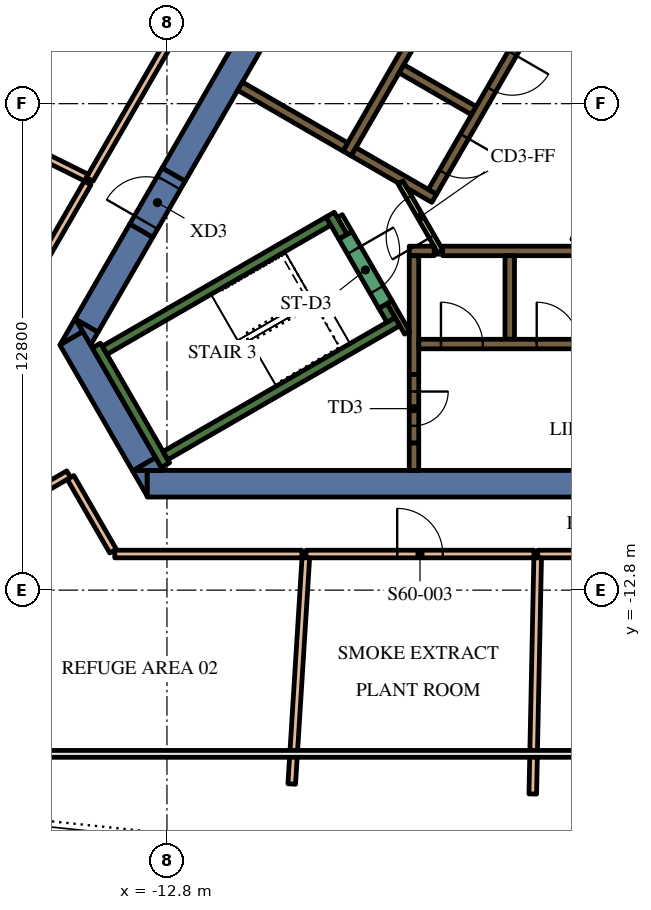
"""IFC4 building model, lengths in metres.
Left out: names, types, materials, properties, quantities, classifications, styles, units other than length and angle.
Written with IfcOpenShell. Run it as: python <this file> out.ifc"""

import sys

from ifc_helpers import new_model, si_unit, direction, frame, frame_2d, origin, place, context, subcontext, project, spatial, polyline, rectangle, outline, extrude, element, fill, save


model = new_model("IFC4")
c1 = context("Model", 3, precision=1e-05, world=origin(), true_north=direction((0.0, 1.0)))
c2 = subcontext(c1, "Body", "Model", "MODEL_VIEW")
j1 = project(units=[si_unit("LENGTHUNIT", "METRE"), si_unit("PLANEANGLEUNIT", "RADIAN")], contexts=[c1])
p1 = place(None, origin())
s1 = spatial("IfcSite", under=j1, at=p1, CompositionType="ELEMENT")
p2 = place(p1, origin())
s2 = spatial("IfcBuilding", under=s1, at=p2, CompositionType="ELEMENT")
p3 = place(p2, frame((0.0, 0.0, 256.2)))
s3 = spatial("IfcBuildingStorey", under=s2, at=p3, CompositionType="ELEMENT", Elevation=256.2)
p4 = place(p3, frame((8.904, -10.0, 0.0), z_axis=(0.0, 0.0, 1.0), x_axis=(-1.0, 0.0, 0.0)))
e1 = element("IfcWall", 1, at=p4, inside=s3, PredefinedType="SOLIDWALL", context=c2, shape_type="SweptSolid", body=[
    extrude(rectangle(XDim=22.226, YDim=0.7, at=frame_2d((11.113, 0.0))), origin(), (0.0, 0.0, 1.0), 5.4),
])
p5 = place(p3, origin())
e2 = element("IfcWall", 2, at=p5, inside=s3, PredefinedType="SOLIDWALL", context=c2, shape_type="SweptSolid", body=[
    extrude(outline(polyline([(-13.712, -9.65), (-13.324, -9.65), (-13.324, -10.322), (-13.712, -9.65)])), origin(), (0.0, 0.0, 1.0), 5.4),
])
p6 = place(p3, frame((-13.402, -9.487, 0.0), z_axis=(0.0, 0.0, 1.0), x_axis=(-0.500020498207, 0.866013568815, 0.0)))
e3 = element("IfcWall", 3, at=p6, inside=s3, PredefinedType="SOLIDWALL", context=c2, shape_type="SweptSolid", body=[
    extrude(rectangle(XDim=3.829, YDim=0.7, at=frame_2d((1.915, 0.0))), origin(), (0.0, 0.0, 1.0), 5.4),
])
e4 = element("IfcWall", 4, at=p5, inside=s3, PredefinedType="SOLIDWALL", context=c2, shape_type="SweptSolid", body=[
    extrude(outline(polyline([(-15.014, -5.995), (-15.611, -6.339), (-15.213, -5.65), (-15.014, -5.995)])), origin(), (0.0, 0.0, 1.0), 5.4),
])
e5 = element("IfcWall", 5, at=p5, inside=s3, PredefinedType="SOLIDWALL", context=c2, shape_type="SweptSolid", body=[
    extrude(outline(polyline([(-12.904, -9.65), (-13.68, -9.65), (-13.098, -9.314), (-12.904, -9.65)])), origin(), (0.0, 0.0, 1.0), 5.4),
])
p7 = place(p3, frame((-13.475, -3.339, 0.0), z_axis=(0.0, 0.0, 1.0), x_axis=(-0.500008214683, -0.866020660983, 0.0)))
e6 = element("IfcWall", 6, at=p7, inside=s3, PredefinedType="SOLIDWALL", context=c2, shape_type="SweptSolid", body=[
    extrude(rectangle(XDim=2.884, YDim=0.7, at=frame_2d((1.442, 0.0))), origin(), (0.0, 0.0, 1.0), 5.4),
])
e7 = element("IfcWall", 7, at=p5, inside=s3, PredefinedType="SOLIDWALL", context=c2, shape_type="SweptSolid", body=[
    extrude(outline(polyline([(-14.809, -6.35), (-15.197, -5.678), (-14.615, -6.014), (-14.809, -6.35)])), origin(), (0.0, 0.0, 1.0), 5.4),
])
p8 = place(p3, frame((-12.625, -1.867, 0.0), z_axis=(0.0, 0.0, 1.0), x_axis=(0.499996974394, 0.866027150612, 0.0)))
e8 = element("IfcWall", 8, at=p8, inside=s3, PredefinedType="SOLIDWALL", context=c2, shape_type="SweptSolid", body=[
    extrude(rectangle(XDim=15.858, YDim=0.7, at=frame_2d((7.929, 0.0))), origin(), (0.0, 0.0, 1.0), 5.4),
])
p9 = place(p3, frame((-12.84, -9.511, 0.0), z_axis=(0.0, 0.0, 1.0), x_axis=(-0.499997733992, 0.866026712061, 0.0)))
e9 = element("IfcWall", 9, at=p9, inside=s3, PredefinedType="SOLIDWALL", context=c2, shape_type="SweptSolid", body=[
    extrude(rectangle(XDim=3.634, YDim=0.25, at=frame_2d((1.817, 0.0))), origin(), (0.0, 0.0, 1.0), 5.4),
])
p10 = place(p3, frame((-14.44, -6.49, 0.0), z_axis=(0.0, 0.0, 1.0), x_axis=(0.866022966069, 0.500004222222, 0.0)))
e10 = element("IfcWall", 10, at=p10, inside=s3, PredefinedType="SOLIDWALL", context=c2, shape_type="SweptSolid", body=[
    extrude(rectangle(XDim=6.8, YDim=0.25, at=frame_2d((3.4, 0.0))), origin(), (0.0, 0.0, 1.0), 5.4),
])
p11 = place(p3, frame((-8.168, -3.503, 0.0), z_axis=(0.0, 0.0, 1.0), x_axis=(-0.499952099219, 0.866053057547, 0.0)))
e11 = element("IfcWall", 11, at=p11, inside=s3, PredefinedType="SOLIDWALL", context=c2, shape_type="SweptSolid", body=[
    extrude(rectangle(XDim=0.675, YDim=0.25, at=frame_2d((0.337, 0.0))), origin(), (0.0, 0.0, 1.0), 5.4),
])
p12 = place(p3, frame((-12.84, -9.261, 0.0), z_axis=(0.0, 0.0, 1.0), x_axis=(0.866016039709, 0.500016218704, 0.0)))
e12 = element("IfcWall", 12, at=p12, inside=s3, PredefinedType="SOLIDWALL", context=c2, shape_type="SweptSolid", body=[
    extrude(rectangle(XDim=7.05, YDim=0.25, at=frame_2d((3.525, 0.0))), origin(), (0.0, 0.0, 1.0), 5.4),
])
p13 = place(p3, frame((-6.905, -5.69, 0.0), z_axis=(0.0, 0.0, 1.0), x_axis=(-0.500402024738, 0.865793170242, 0.0)))
e13 = element("IfcWall", 13, at=p13, inside=s3, PredefinedType="SOLIDWALL", context=c2, shape_type="SweptSolid", body=[
    extrude(rectangle(XDim=0.425, YDim=0.25, at=frame_2d((0.212, 0.0))), origin(), (0.0, 0.0, 1.0), 5.4),
])
p14 = place(p3, frame((-6.3, -8.925, 0.0), z_axis=(0.0, 0.0, 1.0), x_axis=(0.0, -1.0, 0.0)))
e14 = element("IfcWall", 14, at=p14, inside=s3, PredefinedType="SOLIDWALL", context=c2, shape_type="SweptSolid", body=[
    extrude(rectangle(XDim=0.725, YDim=0.25, at=frame_2d((0.363, 0.0))), origin(), (0.0, 0.0, 1.0), 5.4),
])
p15 = place(p3, frame((-5.545, -3.875, 0.0), z_axis=(0.0, 0.0, 1.0), x_axis=(1.0, 0.0, 0.0)))
e15 = element("IfcWall", 15, at=p15, inside=s3, PredefinedType="SOLIDWALL", context=c2, shape_type="SweptSolid", body=[
    extrude(rectangle(XDim=11.97, YDim=0.25, at=frame_2d((5.985, 0.0))), origin(), (0.0, 0.0, 1.0), 5.4),
])
p16 = place(p3, frame((-6.425, -3.875, 0.0), z_axis=(0.0, 0.0, 1.0), x_axis=(1.0, 0.0, 0.0)))
e16 = element("IfcWall", 16, at=p16, inside=s3, PredefinedType="SOLIDWALL", context=c2, shape_type="SweptSolid", body=[
    extrude(rectangle(XDim=0.658, YDim=0.25, at=frame_2d((0.329, 0.0))), origin(), (0.0, 0.0, 1.0), 5.4),
])
p17 = place(p3, frame((-3.78, -4.0, 0.0), z_axis=(0.0, 0.0, 1.0), x_axis=(0.0, -1.0, 0.0)))
e17 = element("IfcWall", 17, at=p17, inside=s3, PredefinedType="SOLIDWALL", context=c2, shape_type="SweptSolid", body=[
    extrude(rectangle(XDim=2.2, YDim=0.25, at=frame_2d((1.1, 0.0))), origin(), (0.0, 0.0, 1.0), 5.4),
])
p18 = place(p3, frame((-6.3, -7.125, 0.0), z_axis=(0.0, 0.0, 1.0), x_axis=(0.0, 1.0, 0.0)))
e18 = element("IfcWall", 18, at=p18, inside=s3, PredefinedType="SOLIDWALL", context=c2, shape_type="SweptSolid", body=[
    extrude(rectangle(XDim=3.125, YDim=0.25, at=frame_2d((1.562, 0.0))), origin(), (0.0, 0.0, 1.0), 5.4),
])
p19 = place(p3, frame((-8.06, -1.311, 0.0), z_axis=(0.0, 0.0, 1.0), x_axis=(0.50000273126, 0.866023826885, 0.0)))
e19 = element("IfcWall", 19, at=p19, inside=s3, PredefinedType="SOLIDWALL", context=c2, shape_type="SweptSolid", body=[
    extrude(rectangle(XDim=10.33, YDim=0.25, at=frame_2d((5.165, 0.0))), origin(), (0.0, 0.0, 1.0), 5.4),
])
p20 = place(p3, frame((-4.724, -0.182, 0.0), z_axis=(0.0, 0.0, 1.0), x_axis=(-0.866008176907, 0.50002983664, 0.0)))
e20 = element("IfcWall", 20, at=p20, inside=s3, PredefinedType="SOLIDWALL", context=c2, shape_type="SweptSolid", body=[
    extrude(rectangle(XDim=2.2, YDim=0.25, at=frame_2d((1.1, 0.0))), origin(), (0.0, 0.0, 1.0), 5.4),
])
e21 = element("IfcWall", 21, at=p5, inside=s3, PredefinedType="SOLIDWALL", context=c2, shape_type="SweptSolid", body=[
    extrude(outline(polyline([(-5.922, -2.257), (-5.922, -2.257), (-5.705, -2.382), (-5.83, -2.598), (-6.483, -2.221), (-6.591, -2.033), (-6.591, -2.033), (-6.7, -2.096), (-7.952, -1.373), (-7.827, -1.156), (-5.922, -2.257)])), origin(), (0.0, 0.0, 1.0), 5.4),
])
p21 = place(p3, frame((-8.106, -1.14, 0.0), z_axis=(0.0, 0.0, 1.0), x_axis=(-0.866008981251, 0.500028443584, 0.0)))
e22 = element("IfcWall", 22, at=p21, inside=s3, PredefinedType="SOLIDWALL", context=c2, shape_type="SweptSolid", body=[
    extrude(rectangle(XDim=3.2, YDim=0.25, at=frame_2d((1.6, 0.0))), origin(), (0.0, 0.0, 1.0), 5.4),
])
p22 = place(p3, frame((-8.252, -2.958, 0.0), z_axis=(0.0, 0.0, 1.0), x_axis=(0.500174715838, -0.865924508047, 0.0)))
e23 = element("IfcWall", 23, at=p22, inside=s3, PredefinedType="PARTITIONING", context=c2, shape_type="SweptSolid", body=[
    extrude(rectangle(XDim=0.514, YDim=0.15, at=frame_2d((0.257, 0.0))), origin(), (0.0, 0.0, 1.0), 4.3),
])
p23 = place(p3, frame((-6.48, -6.027, 0.0), z_axis=(0.0, 0.0, 1.0), x_axis=(-0.499927229454, 0.866067413802, 0.0)))
e24 = element("IfcWall", 24, at=p23, inside=s3, PredefinedType="PARTITIONING", context=c2, shape_type="SweptSolid", body=[
    extrude(rectangle(XDim=0.929, YDim=0.15, at=frame_2d((0.464, 0.0))), origin(), (0.0, 0.0, 1.0), 5.4),
])
e25 = element("IfcWall", 25, at=p5, inside=s3, PredefinedType="PARTITIONING", context=c2, shape_type="SweptSolid", body=[
    extrude(outline(polyline([(-0.59, -0.872), (-0.265, -1.059), (-1.822, -3.756), (-2.147, -3.568), (-0.59, -0.872)])), origin(), (0.0, 0.0, 1.0), 4.3),
])
p24 = place(p3, frame((-6.175, -6.325, 0.0), z_axis=(0.0, 0.0, 1.0), x_axis=(1.0, 0.0, 0.0)))
e26 = element("IfcWall", 26, at=p24, inside=s3, PredefinedType="SOLIDWALL", context=c2, shape_type="SweptSolid", body=[
    extrude(rectangle(XDim=12.35, YDim=0.25, at=frame_2d((6.175, 0.0))), origin(), (0.0, 0.0, 1.0), 5.4),
])
p25 = place(p24, frame((0.585, 0.0, 0.0)))
e27 = element("IfcOpeningElement", 27, at=p25, cuts=e26, PredefinedType="OPENING", context=c2, shape_type="SweptSolid", body=[
    extrude(rectangle(XDim=1.1, YDim=2.1, at=frame_2d((0.55, 1.05))), frame((0.0, 0.135, 0.0), z_axis=(0.0, -1.0, 0.0), x_axis=(1.0, 0.0, 0.0)), (0.0, 0.0, 1.0), 0.27),
])
p26 = place(p24, frame((3.105, 0.0, 0.0)))
e28 = element("IfcOpeningElement", 28, at=p26, cuts=e26, PredefinedType="OPENING", context=c2, shape_type="SweptSolid", body=[
    extrude(rectangle(XDim=1.1, YDim=2.1, at=frame_2d((0.55, 1.05))), frame((0.0, 0.135, 0.0), z_axis=(0.0, -1.0, 0.0), x_axis=(1.0, 0.0, 0.0)), (0.0, 0.0, 1.0), 0.27),
])
p27 = place(p24, frame((5.625, 0.0, 0.0)))
e29 = element("IfcOpeningElement", 29, at=p27, cuts=e26, PredefinedType="OPENING", context=c2, shape_type="SweptSolid", body=[
    extrude(rectangle(XDim=1.1, YDim=2.1, at=frame_2d((0.55, 1.05))), frame((0.0, 0.135, 0.0), z_axis=(0.0, -1.0, 0.0), x_axis=(1.0, 0.0, 0.0)), (0.0, 0.0, 1.0), 0.27),
])
p28 = place(p24, frame((8.145, 0.0, 0.0)))
e30 = element("IfcOpeningElement", 30, at=p28, cuts=e26, PredefinedType="OPENING", context=c2, shape_type="SweptSolid", body=[
    extrude(rectangle(XDim=1.1, YDim=2.1, at=frame_2d((0.55, 1.05))), frame((0.0, 0.135, 0.0), z_axis=(0.0, -1.0, 0.0), x_axis=(1.0, 0.0, 0.0)), (0.0, 0.0, 1.0), 0.27),
])
p29 = place(p24, frame((10.665, 0.0, 0.0)))
e31 = element("IfcOpeningElement", 31, at=p29, cuts=e26, PredefinedType="OPENING", context=c2, shape_type="SweptSolid", body=[
    extrude(rectangle(XDim=1.1, YDim=2.1, at=frame_2d((0.55, 1.05))), frame((0.0, 0.135, 0.0), z_axis=(0.0, -1.0, 0.0), x_axis=(1.0, 0.0, 0.0)), (0.0, 0.0, 1.0), 0.27),
])
p30 = place(p3, frame((-0.898, 6.194, 0.0), z_axis=(0.0, 0.0, 1.0), x_axis=(-0.499996202215, -0.866027596426, 0.0)))
e32 = element("IfcWall", 32, at=p30, inside=s3, PredefinedType="SOLIDWALL", context=c2, shape_type="SweptSolid", body=[
    extrude(rectangle(XDim=9.83, YDim=0.25, at=frame_2d((4.915, 0.0))), origin(), (0.0, 0.0, 1.0), 5.4),
])
p31 = place(p30, frame((0.585, 0.0, 0.0)))
e33 = element("IfcOpeningElement", 33, at=p31, cuts=e32, PredefinedType="OPENING", context=c2, shape_type="SweptSolid", body=[
    extrude(rectangle(XDim=1.1, YDim=2.1, at=frame_2d((0.55, 1.05))), frame((0.0, 0.135, 0.0), z_axis=(0.0, -1.0, 0.0), x_axis=(1.0, 0.0, 0.0)), (0.0, 0.0, 1.0), 0.27),
])
p32 = place(p30, frame((3.105, 0.0, 0.0)))
e34 = element("IfcOpeningElement", 34, at=p32, cuts=e32, PredefinedType="OPENING", context=c2, shape_type="SweptSolid", body=[
    extrude(rectangle(XDim=1.1, YDim=2.1, at=frame_2d((0.55, 1.05))), frame((0.0, 0.135, 0.0), z_axis=(0.0, -1.0, 0.0), x_axis=(1.0, 0.0, 0.0)), (0.0, 0.0, 1.0), 0.27),
])
p33 = place(p30, frame((5.625, 0.0, 0.0)))
e35 = element("IfcOpeningElement", 35, at=p33, cuts=e32, PredefinedType="OPENING", context=c2, shape_type="SweptSolid", body=[
    extrude(rectangle(XDim=1.1, YDim=2.1, at=frame_2d((0.55, 1.05))), frame((0.0, 0.135, 0.0), z_axis=(0.0, -1.0, 0.0), x_axis=(1.0, 0.0, 0.0)), (0.0, 0.0, 1.0), 0.27),
])
p34 = place(p30, frame((8.145, 0.0, 0.0)))
e36 = element("IfcOpeningElement", 36, at=p34, cuts=e32, PredefinedType="OPENING", context=c2, shape_type="SweptSolid", body=[
    extrude(rectangle(XDim=1.1, YDim=2.1, at=frame_2d((0.55, 1.05))), frame((0.0, 0.135, 0.0), z_axis=(0.0, -1.0, 0.0), x_axis=(1.0, 0.0, 0.0)), (0.0, 0.0, 1.0), 0.27),
])
p35 = place(p3, frame((-8.103, -3.466, 0.0), z_axis=(0.0, 0.0, 1.0), x_axis=(0.500078061341, -0.865980330357, 0.0)))
e37 = element("IfcWall", 37, at=p35, inside=s3, PredefinedType="SOLIDWALL", context=c2, shape_type="SweptSolid", body=[
    extrude(rectangle(XDim=2.1, YDim=0.4, at=frame_2d((1.05, 0.0))), origin(), (0.0, 0.0, 1.0), 5.4),
])
p36 = place(p35, frame((0.45, 0.0, 0.0)))
e38 = element("IfcOpeningElement", 38, at=p36, cuts=e37, PredefinedType="OPENING", context=c2, shape_type="SweptSolid", body=[
    extrude(rectangle(XDim=1.2, YDim=2.1, at=frame_2d((0.6, 1.05))), frame((0.0, 0.21, 0.0), z_axis=(0.0, -1.0, 0.0), x_axis=(1.0, 0.0, 0.0)), (0.0, 0.0, 1.0), 0.42),
])
p37 = place(p3, frame((-6.3, -7.125, 0.0), z_axis=(0.0, 0.0, 1.0), x_axis=(0.0, -1.0, 0.0)))
e39 = element("IfcWall", 39, at=p37, inside=s3, PredefinedType="SOLIDWALL", context=c2, shape_type="SweptSolid", body=[
    extrude(rectangle(XDim=1.8, YDim=0.25, at=frame_2d((0.9, 0.0))), origin(), (0.0, 0.0, 1.0), 5.4),
])
p38 = place(p37, frame((0.45, 0.0, 0.0)))
e40 = element("IfcOpeningElement", 40, at=p38, cuts=e39, PredefinedType="OPENING", context=c2, shape_type="SweptSolid", body=[
    extrude(rectangle(XDim=0.9, YDim=2.1, at=frame_2d((0.45, 1.05))), frame((0.0, 0.135, 0.0), z_axis=(0.0, -1.0, 0.0), x_axis=(1.0, 0.0, 0.0)), (0.0, 0.0, 1.0), 0.27),
])
p39 = place(p3, frame((-5.606, -3.89, 0.0), z_axis=(0.0, 0.0, 1.0), x_axis=(-0.500027713859, 0.866009402589, 0.0)))
e41 = element("IfcWall", 41, at=p39, inside=s3, PredefinedType="PARTITIONING", context=c2, shape_type="SweptSolid", body=[
    extrude(rectangle(XDim=2.1, YDim=0.15, at=frame_2d((1.05, 0.0))), origin(), (0.0, 0.0, 1.0), 4.3),
])
p40 = place(p39, frame((0.45, 0.0, 0.0)))
e42 = element("IfcOpeningElement", 42, at=p40, cuts=e41, PredefinedType="OPENING", context=c2, shape_type="SweptSolid", body=[
    extrude(rectangle(XDim=1.2, YDim=2.1, at=frame_2d((0.6, 1.05))), frame((0.0, 0.085, 0.0), z_axis=(0.0, -1.0, 0.0), x_axis=(1.0, 0.0, 0.0)), (0.0, 0.0, 1.0), 0.17),
])
p41 = place(p3, frame((-13.475, -3.339, 0.0), z_axis=(0.0, 0.0, 1.0), x_axis=(0.499954529098, 0.86605165483, 0.0)))
e43 = element("IfcWall", 43, at=p41, inside=s3, PredefinedType="SOLIDWALL", context=c2, shape_type="SweptSolid", body=[
    extrude(rectangle(XDim=1.7, YDim=0.7, at=frame_2d((0.85, 0.0))), origin(), (0.0, 0.0, 1.0), 5.4),
])
p42 = place(p41, frame((0.25, 0.0, 0.0)))
e44 = element("IfcOpeningElement", 44, at=p42, cuts=e43, PredefinedType="OPENING", context=c2, shape_type="SweptSolid", body=[
    extrude(rectangle(XDim=1.2, YDim=2.1, at=frame_2d((0.6, 1.05))), frame((0.0, 0.36, 0.0), z_axis=(0.0, -1.0, 0.0), x_axis=(1.0, 0.0, 0.0)), (0.0, 0.0, 1.0), 0.72),
])
p43 = place(p3, frame((-3.043, -11.85, 0.0), z_axis=(0.0, 0.0, 1.0), x_axis=(1.0, 0.0, 0.0)))
e45 = element("IfcWall", 45, at=p43, inside=s3, PredefinedType="PARTITIONING", context=c2, shape_type="SweptSolid", body=[
    extrude(rectangle(XDim=17.217, YDim=0.2, at=frame_2d((8.608, 0.0))), origin(), (0.0, 0.0, 1.0), 4.3),
])
p44 = place(p43, frame((8.009, 0.0, 0.0)))
e46 = element("IfcOpeningElement", 46, at=p44, cuts=e45, PredefinedType="OPENING", context=c2, shape_type="SweptSolid", body=[
    extrude(rectangle(XDim=1.2, YDim=2.1, at=frame_2d((0.6, 1.05))), frame((0.0, 0.11, 0.0), z_axis=(0.0, -1.0, 0.0), x_axis=(1.0, 0.0, 0.0)), (0.0, 0.0, 1.0), 0.22),
])
p45 = place(p3, frame((-8.741, 8.561, 0.0), z_axis=(0.0, 0.0, 1.0), x_axis=(-0.500009820262, -0.866019733979, 0.0)))
e47 = element("IfcWall", 47, at=p45, inside=s3, PredefinedType="PARTITIONING", context=c2, shape_type="SweptSolid", body=[
    extrude(rectangle(XDim=12.183, YDim=0.2, at=frame_2d((6.092, 0.0))), origin(), (0.0, 0.0, 1.0), 4.3),
])
p46 = place(p45, frame((5.492, 0.0, 0.0)))
e48 = element("IfcOpeningElement", 48, at=p46, cuts=e47, PredefinedType="OPENING", context=c2, shape_type="SweptSolid", body=[
    extrude(rectangle(XDim=1.2, YDim=2.1, at=frame_2d((0.6, 1.05))), frame((0.0, 0.11, 0.0), z_axis=(0.0, -1.0, 0.0), x_axis=(1.0, 0.0, 0.0)), (0.0, 0.0, 1.0), 0.22),
])
p47 = place(p3, frame((-23.343, -14.343, 0.0), z_axis=(0.0, 0.0, 1.0), x_axis=(0.866028486751, 0.499994660107, 0.0)))
e49 = element("IfcWall", 49, at=p47, inside=s3, PredefinedType="PARTITIONING", context=c2, shape_type="SweptSolid", body=[
    extrude(rectangle(XDim=9.187, YDim=0.2, at=frame_2d((4.594, 0.0))), origin(), (0.0, 0.0, 1.0), 4.3),
])
p48 = place(p47, frame((3.993, 0.0, 0.0)))
e50 = element("IfcOpeningElement", 50, at=p48, cuts=e49, PredefinedType="OPENING", context=c2, shape_type="SweptSolid", body=[
    extrude(rectangle(XDim=1.2, YDim=2.1, at=frame_2d((0.6, 1.05))), frame((0.0, 0.11, 0.0), z_axis=(0.0, -1.0, 0.0), x_axis=(1.0, 0.0, 0.0)), (0.0, 0.0, 1.0), 0.22),
])
p49 = place(p3, frame((-3.045, -11.95, 0.0), z_axis=(0.0, 0.0, 1.0), x_axis=(-0.02077728557, -0.999784128902, 0.0)))
e51 = element("IfcWall", 51, at=p49, inside=s3, PredefinedType="PARTITIONING", context=c2, shape_type="SweptSolid", body=[
    extrude(rectangle(XDim=6.216, YDim=0.2, at=frame_2d((3.108, 0.0))), origin(), (0.0, 0.0, 1.0), 4.3),
])
p50 = place(p3, frame((-9.14, -11.85, 0.0), z_axis=(0.0, 0.0, 1.0), x_axis=(1.0, 0.0, 0.0)))
e52 = element("IfcWall", 52, at=p50, inside=s3, PredefinedType="PARTITIONING", context=c2, shape_type="SweptSolid", body=[
    extrude(rectangle(XDim=5.997, YDim=0.2, at=frame_2d((2.999, 0.0))), origin(), (0.0, 0.0, 1.0), 4.3),
])
p51 = place(p50, frame((2.398, 0.0, 0.0)))
e53 = element("IfcOpeningElement", 53, at=p51, cuts=e52, PredefinedType="OPENING", context=c2, shape_type="SweptSolid", body=[
    extrude(rectangle(XDim=1.2, YDim=2.1, at=frame_2d((0.6, 1.05))), frame((0.0, 0.11, 0.0), z_axis=(0.0, -1.0, 0.0), x_axis=(1.0, 0.0, 0.0)), (0.0, 0.0, 1.0), 0.22),
])
p52 = place(p3, frame((-9.146, -11.95, 0.0), z_axis=(0.0, 0.0, 1.0), x_axis=(-0.062232994457, -0.998061648597, 0.0)))
e54 = element("IfcWall", 54, at=p52, inside=s3, PredefinedType="PARTITIONING", context=c2, shape_type="SweptSolid", body=[
    extrude(rectangle(XDim=5.963, YDim=0.2, at=frame_2d((2.981, 0.0))), origin(), (0.0, 0.0, 1.0), 4.3),
])
p53 = place(p3, frame((-20.261, 0.708, 0.0), z_axis=(0.0, 0.0, 1.0), x_axis=(0.895456612303, -0.445148801507, 0.0)))
e55 = element("IfcWall", 55, at=p53, inside=s3, PredefinedType="PARTITIONING", context=c2, shape_type="SweptSolid", body=[
    extrude(rectangle(XDim=5.963, YDim=0.2, at=frame_2d((2.981, 0.0))), origin(), (0.0, 0.0, 1.0), 4.3),
])
for number, where, z_axis, x_axis in (
    (56, (-9.25, -11.85, 0.0), (0.0, 0.0, 1.0), (-1.0, 0.0, 0.0)),
    (57, (-17.349, -6.35, 0.0), (0.0, 0.0, 1.0), (0.5, 0.866, 0.0)),
):
    element("IfcWall", number, at=place(p3, frame(where, z_axis=z_axis, x_axis=x_axis)), inside=s3, PredefinedType="PARTITIONING", context=c2, shape_type="SweptSolid", body=[
        extrude(rectangle(XDim=4.924, YDim=0.2, at=frame_2d((2.462, 0.0))), origin(), (0.0, 0.0, 1.0), 4.3),
    ])
p54 = place(p3, frame((-14.219, -11.772, 0.0), z_axis=(0.0, 0.0, 1.0), x_axis=(-0.499968249168, 0.86604373436, 0.0)))
e58 = element("IfcWall", 58, at=p54, inside=s3, PredefinedType="PARTITIONING", context=c2, shape_type="SweptSolid", body=[
    extrude(rectangle(XDim=2.236, YDim=0.2, at=frame_2d((1.118, 0.0))), origin(), (0.0, 0.0, 1.0), 4.3),
])
p55 = place(p25, origin())
e59 = element("IfcDoor", 59, at=p55, inside=s3, OperationType="DOUBLE_DOOR_SLIDING", PredefinedType="DOOR", context=c2, shape_type="SweptSolid", body=[
    extrude(rectangle(XDim=1.1, YDim=2.1, at=frame_2d((0.55, 1.05))), frame((0.0, 0.025, 0.0), z_axis=(0.0, -1.0, 0.0), x_axis=(1.0, 0.0, 0.0)), (0.0, 0.0, 1.0), 0.05),
])
fill(e27, e59)
p56 = place(p26, origin())
e60 = element("IfcDoor", 60, at=p56, inside=s3, OperationType="DOUBLE_DOOR_SLIDING", PredefinedType="DOOR", context=c2, shape_type="SweptSolid", body=[
    extrude(rectangle(XDim=1.1, YDim=2.1, at=frame_2d((0.55, 1.05))), frame((0.0, 0.025, 0.0), z_axis=(0.0, -1.0, 0.0), x_axis=(1.0, 0.0, 0.0)), (0.0, 0.0, 1.0), 0.05),
])
fill(e28, e60)
p57 = place(p33, origin())
e61 = element("IfcDoor", 61, at=p57, inside=s3, OperationType="DOUBLE_DOOR_SLIDING", PredefinedType="DOOR", context=c2, shape_type="SweptSolid", body=[
    extrude(rectangle(XDim=1.1, YDim=2.1, at=frame_2d((0.55, 1.05))), frame((0.0, 0.025, 0.0), z_axis=(0.0, -1.0, 0.0), x_axis=(1.0, 0.0, 0.0)), (0.0, 0.0, 1.0), 0.05),
])
fill(e35, e61)
p58 = place(p34, origin())
e62 = element("IfcDoor", 62, at=p58, inside=s3, OperationType="DOUBLE_DOOR_SLIDING", PredefinedType="DOOR", context=c2, shape_type="SweptSolid", body=[
    extrude(rectangle(XDim=1.1, YDim=2.1, at=frame_2d((0.55, 1.05))), frame((0.0, 0.025, 0.0), z_axis=(0.0, -1.0, 0.0), x_axis=(1.0, 0.0, 0.0)), (0.0, 0.0, 1.0), 0.05),
])
fill(e36, e62)
p59 = place(p36, origin())
e63 = element("IfcDoor", 63, at=p59, inside=s3, OperationType="SINGLE_SWING_LEFT", PredefinedType="DOOR", context=c2, shape_type="SweptSolid", body=[
    extrude(rectangle(XDim=1.2, YDim=2.1, at=frame_2d((0.6, 1.05))), frame((0.0, 0.025, 0.0), z_axis=(0.0, -1.0, 0.0), x_axis=(1.0, 0.0, 0.0)), (0.0, 0.0, 1.0), 0.05),
])
fill(e38, e63)
p60 = place(p38, origin())
e64 = element("IfcDoor", 64, at=p60, inside=s3, OperationType="SINGLE_SWING_LEFT", PredefinedType="DOOR", context=c2, shape_type="SweptSolid", body=[
    extrude(rectangle(XDim=0.9, YDim=2.1, at=frame_2d((0.45, 1.05))), frame((0.0, 0.025, 0.0), z_axis=(0.0, -1.0, 0.0), x_axis=(1.0, 0.0, 0.0)), (0.0, 0.0, 1.0), 0.05),
])
fill(e40, e64)
p61 = place(p40, origin())
e65 = element("IfcDoor", 65, at=p61, inside=s3, OperationType="SINGLE_SWING_LEFT", PredefinedType="DOOR", context=c2, shape_type="SweptSolid", body=[
    extrude(rectangle(XDim=1.2, YDim=2.1, at=frame_2d((0.6, 1.05))), frame((0.0, 0.025, 0.0), z_axis=(0.0, -1.0, 0.0), x_axis=(1.0, 0.0, 0.0)), (0.0, 0.0, 1.0), 0.05),
])
fill(e42, e65)
p62 = place(p42, origin())
e66 = element("IfcDoor", 66, at=p62, inside=s3, OperationType="SINGLE_SWING_LEFT", PredefinedType="DOOR", context=c2, shape_type="SweptSolid", body=[
    extrude(rectangle(XDim=1.2, YDim=2.1, at=frame_2d((0.6, 1.05))), frame((0.0, 0.025, 0.0), z_axis=(0.0, -1.0, 0.0), x_axis=(1.0, 0.0, 0.0)), (0.0, 0.0, 1.0), 0.05),
])
fill(e44, e66)
p63 = place(p51, origin())
e67 = element("IfcDoor", 67, at=p63, inside=s3, OperationType="SINGLE_SWING_RIGHT", PredefinedType="DOOR", context=c2, shape_type="SweptSolid", body=[
    extrude(rectangle(XDim=1.2, YDim=2.1, at=frame_2d((0.6, 1.05))), frame((0.0, 0.025, 0.0), z_axis=(0.0, -1.0, 0.0), x_axis=(1.0, 0.0, 0.0)), (0.0, 0.0, 1.0), 0.05),
])
fill(e53, e67)
save(model, sys.argv[1])
